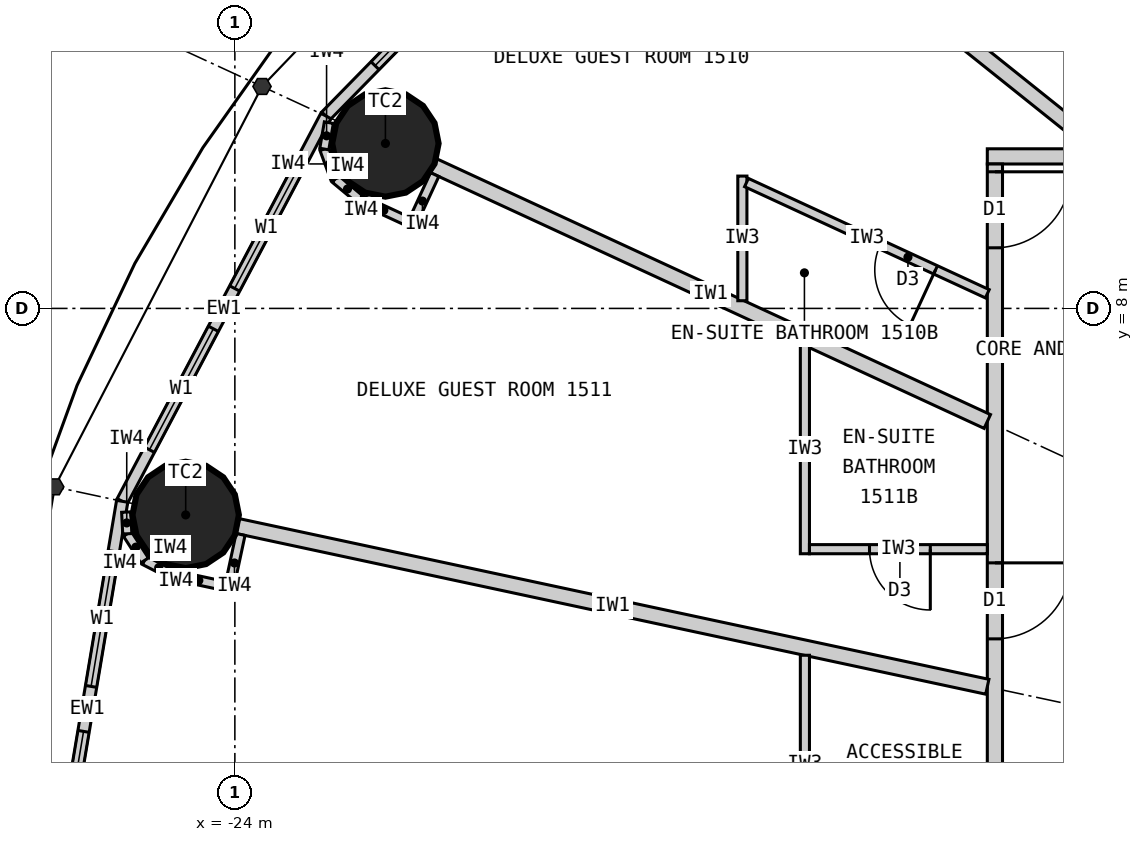
"""IFC4 building model, lengths in metres.
Left out: names, types, materials, properties, quantities, classifications, styles, units other than length and angle.
Written with IfcOpenShell. Run it as: python <this file> out.ifc"""

import sys

from ifc_helpers import new_model, si_unit, direction, frame, frame_2d, origin, origin_2d, place, context, subcontext, project, spatial, rectangle, circle, extrude, element, fill, save


model = new_model("IFC4")
c1 = context("Model", 3, precision=1e-05, world=origin(), true_north=direction((0.0, 1.0)))
c2 = subcontext(c1, "Body", "Model", "MODEL_VIEW")
j1 = project(units=[si_unit("LENGTHUNIT", "METRE"), si_unit("PLANEANGLEUNIT", "RADIAN")], contexts=[c1])
p1 = place(None, origin())
s1 = spatial("IfcSite", under=j1, at=p1, CompositionType="ELEMENT")
p2 = place(p1, origin())
s2 = spatial("IfcBuilding", under=s1, at=p2, CompositionType="ELEMENT")
p3 = place(p2, frame((0.0, 0.0, 63.9)))
s3 = spatial("IfcBuildingStorey", under=s2, at=p3, CompositionType="ELEMENT", Elevation=63.9)
for number, where, z_axis, x_axis in (
    (1, (-22.019, 10.17, 0.0), (0.0, 0.0, 1.0), (1.0, 0.0, 0.0)),
    (2, (-24.647, 5.283, 0.0), (0.0, 0.0, 1.0), (1.0, 0.0, 0.0)),
):
    element("IfcColumn", number, at=place(p3, frame(where, z_axis=z_axis, x_axis=x_axis)), inside=s3, PredefinedType="COLUMN", context=c2, shape_type="SweptSolid", body=[
        extrude(circle(Radius=0.7, at=origin_2d()), origin(), (0.0, 0.0, 1.0), 3.3),
    ])
p4 = place(p3, frame((-18.57, 14.856, 0.0), z_axis=(0.0, 0.0, 1.0), x_axis=(-0.699602905915, -0.714531856557, 0.0)))
e3 = element("IfcWall", 3, at=p4, inside=s3, PredefinedType="ELEMENTEDWALL", context=c2, shape_type="SweptSolid", body=[
    extrude(rectangle(XDim=6.051, YDim=0.15, at=frame_2d((3.025, 0.0))), origin(), (0.0, 0.0, 1.0), 3.12),
])
p5 = place(p4, frame((0.926, 0.0, 0.9)))
e4 = element("IfcOpeningElement", 4, at=p5, cuts=e3, PredefinedType="OPENING", context=c2, shape_type="SweptSolid", body=[
    extrude(rectangle(XDim=1.8, YDim=1.9, at=frame_2d((0.9, 0.95))), frame((0.0, 0.085, 0.0), z_axis=(0.0, -1.0, 0.0), x_axis=(1.0, 0.0, 0.0)), (0.0, 0.0, 1.0), 0.17),
])
p6 = place(p4, frame((3.325, 0.0, 0.9)))
e5 = element("IfcOpeningElement", 5, at=p6, cuts=e3, PredefinedType="OPENING", context=c2, shape_type="SweptSolid", body=[
    extrude(rectangle(XDim=1.8, YDim=1.9, at=frame_2d((0.9, 0.95))), frame((0.0, 0.085, 0.0), z_axis=(0.0, -1.0, 0.0), x_axis=(1.0, 0.0, 0.0)), (0.0, 0.0, 1.0), 0.17),
])
p7 = place(p3, frame((-22.803, 10.532, 0.0), z_axis=(0.0, 0.0, 1.0), x_axis=(-0.467296867008, -0.884100468321, 0.0)))
e6 = element("IfcWall", 6, at=p7, inside=s3, PredefinedType="ELEMENTEDWALL", context=c2, shape_type="SweptSolid", body=[
    extrude(rectangle(XDim=5.734, YDim=0.15, at=frame_2d((2.867, 0.0))), origin(), (0.0, 0.0, 1.0), 3.12),
])
p8 = place(p7, frame((0.767, 0.0, 0.9)))
e7 = element("IfcOpeningElement", 7, at=p8, cuts=e6, PredefinedType="OPENING", context=c2, shape_type="SweptSolid", body=[
    extrude(rectangle(XDim=1.8, YDim=1.9, at=frame_2d((0.9, 0.95))), frame((0.0, 0.085, 0.0), z_axis=(0.0, -1.0, 0.0), x_axis=(1.0, 0.0, 0.0)), (0.0, 0.0, 1.0), 0.17),
])
p9 = place(p7, frame((3.167, 0.0, 0.9)))
e8 = element("IfcOpeningElement", 8, at=p9, cuts=e6, PredefinedType="OPENING", context=c2, shape_type="SweptSolid", body=[
    extrude(rectangle(XDim=1.8, YDim=1.9, at=frame_2d((0.9, 0.95))), frame((0.0, 0.085, 0.0), z_axis=(0.0, -1.0, 0.0), x_axis=(1.0, 0.0, 0.0)), (0.0, 0.0, 1.0), 0.17),
])
p10 = place(p3, frame((-25.482, 5.462, 0.0), z_axis=(0.0, 0.0, 1.0), x_axis=(-0.165642551694, -0.986185857264, 0.0)))
e9 = element("IfcWall", 9, at=p10, inside=s3, PredefinedType="ELEMENTEDWALL", context=c2, shape_type="SweptSolid", body=[
    extrude(rectangle(XDim=5.539, YDim=0.15, at=frame_2d((2.77, 0.0))), origin(), (0.0, 0.0, 1.0), 3.12),
])
p11 = place(p10, frame((0.669, 0.0, 0.9)))
e10 = element("IfcOpeningElement", 10, at=p11, cuts=e9, PredefinedType="OPENING", context=c2, shape_type="SweptSolid", body=[
    extrude(rectangle(XDim=1.8, YDim=1.9, at=frame_2d((0.9, 0.95))), frame((0.0, 0.085, 0.0), z_axis=(0.0, -1.0, 0.0), x_axis=(1.0, 0.0, 0.0)), (0.0, 0.0, 1.0), 0.17),
])
p12 = place(p10, frame((3.07, 0.0, 0.9)))
e11 = element("IfcOpeningElement", 11, at=p12, cuts=e9, PredefinedType="OPENING", context=c2, shape_type="SweptSolid", body=[
    extrude(rectangle(XDim=1.8, YDim=1.9, at=frame_2d((0.9, 0.95))), frame((0.0, 0.085, 0.0), z_axis=(0.0, -1.0, 0.0), x_axis=(1.0, 0.0, 0.0)), (0.0, 0.0, 1.0), 0.17),
])
p13 = place(p3, frame((-14.1, 10.0, 0.0), z_axis=(0.0, 0.0, 1.0), x_axis=(1.0, 0.0, 0.0)))
e12 = element("IfcWall", 12, at=p13, inside=s3, PredefinedType="PARTITIONING", context=c2, shape_type="SweptSolid", body=[
    extrude(rectangle(XDim=28.2, YDim=0.2, at=frame_2d((14.1, 0.0))), origin(), (0.0, 0.0, 1.0), 3.12),
])
p14 = place(p13, frame((18.529, 0.0, 0.0)))
e13 = element("IfcOpeningElement", 13, at=p14, cuts=e12, PredefinedType="OPENING", context=c2, shape_type="SweptSolid", body=[
    extrude(rectangle(XDim=1.0, YDim=2.2, at=frame_2d((0.5, 1.1))), frame((0.0, 0.11, 0.0), z_axis=(0.0, -1.0, 0.0), x_axis=(1.0, 0.0, 0.0)), (0.0, 0.0, 1.0), 0.22),
])
p15 = place(p13, frame((14.623, 0.0, 0.0)))
e14 = element("IfcOpeningElement", 14, at=p15, cuts=e12, PredefinedType="OPENING", context=c2, shape_type="SweptSolid", body=[
    extrude(rectangle(XDim=1.0, YDim=2.2, at=frame_2d((0.5, 1.1))), frame((0.0, 0.11, 0.0), z_axis=(0.0, -1.0, 0.0), x_axis=(1.0, 0.0, 0.0)), (0.0, 0.0, 1.0), 0.22),
])
p16 = place(p13, frame((11.24, 0.0, 0.0)))
e15 = element("IfcOpeningElement", 15, at=p16, cuts=e12, PredefinedType="OPENING", context=c2, shape_type="SweptSolid", body=[
    extrude(rectangle(XDim=1.0, YDim=2.2, at=frame_2d((0.5, 1.1))), frame((0.0, 0.11, 0.0), z_axis=(0.0, -1.0, 0.0), x_axis=(1.0, 0.0, 0.0)), (0.0, 0.0, 1.0), 0.22),
])
p17 = place(p13, frame((8.671, 0.0, 0.0)))
e16 = element("IfcOpeningElement", 16, at=p17, cuts=e12, PredefinedType="OPENING", context=c2, shape_type="SweptSolid", body=[
    extrude(rectangle(XDim=1.0, YDim=2.2, at=frame_2d((0.5, 1.1))), frame((0.0, 0.11, 0.0), z_axis=(0.0, -1.0, 0.0), x_axis=(1.0, 0.0, 0.0)), (0.0, 0.0, 1.0), 0.22),
])
p18 = place(p13, frame((2.801, 0.0, 0.0)))
e17 = element("IfcOpeningElement", 17, at=p18, cuts=e12, PredefinedType="OPENING", context=c2, shape_type="SweptSolid", body=[
    extrude(rectangle(XDim=1.0, YDim=2.2, at=frame_2d((0.5, 1.1))), frame((0.0, 0.11, 0.0), z_axis=(0.0, -1.0, 0.0), x_axis=(1.0, 0.0, 0.0)), (0.0, 0.0, 1.0), 0.22),
])
p19 = place(p3, frame((-14.0, 9.9, 0.0), z_axis=(0.0, 0.0, 1.0), x_axis=(0.0, -1.0, 0.0)))
e18 = element("IfcWall", 18, at=p19, inside=s3, PredefinedType="PARTITIONING", context=c2, shape_type="SweptSolid", body=[
    extrude(rectangle(XDim=19.8, YDim=0.2, at=frame_2d((9.9, 0.0))), origin(), (0.0, 0.0, 1.0), 3.12),
])
p20 = place(p19, frame((0.103, 0.0, 0.0)))
e19 = element("IfcOpeningElement", 19, at=p20, cuts=e18, PredefinedType="OPENING", context=c2, shape_type="SweptSolid", body=[
    extrude(rectangle(XDim=1.0, YDim=2.2, at=frame_2d((0.5, 1.1))), frame((0.0, 0.11, 0.0), z_axis=(0.0, -1.0, 0.0), x_axis=(1.0, 0.0, 0.0)), (0.0, 0.0, 1.0), 0.22),
])
p21 = place(p19, frame((5.248, 0.0, 0.0)))
e20 = element("IfcOpeningElement", 20, at=p21, cuts=e18, PredefinedType="OPENING", context=c2, shape_type="SweptSolid", body=[
    extrude(rectangle(XDim=1.0, YDim=2.2, at=frame_2d((0.5, 1.1))), frame((0.0, 0.11, 0.0), z_axis=(0.0, -1.0, 0.0), x_axis=(1.0, 0.0, 0.0)), (0.0, 0.0, 1.0), 0.22),
])
p22 = place(p19, frame((9.438, 0.0, 0.0)))
e21 = element("IfcOpeningElement", 21, at=p22, cuts=e18, PredefinedType="OPENING", context=c2, shape_type="SweptSolid", body=[
    extrude(rectangle(XDim=1.0, YDim=2.2, at=frame_2d((0.5, 1.1))), frame((0.0, 0.11, 0.0), z_axis=(0.0, -1.0, 0.0), x_axis=(1.0, 0.0, 0.0)), (0.0, 0.0, 1.0), 0.22),
])
p23 = place(p19, frame((13.942, 0.0, 0.0)))
e22 = element("IfcOpeningElement", 22, at=p23, cuts=e18, PredefinedType="OPENING", context=c2, shape_type="SweptSolid", body=[
    extrude(rectangle(XDim=1.0, YDim=2.2, at=frame_2d((0.5, 1.1))), frame((0.0, 0.11, 0.0), z_axis=(0.0, -1.0, 0.0), x_axis=(1.0, 0.0, 0.0)), (0.0, 0.0, 1.0), 0.22),
])
p24 = place(p19, frame((18.698, 0.0, 0.0)))
e23 = element("IfcOpeningElement", 23, at=p24, cuts=e18, PredefinedType="OPENING", context=c2, shape_type="SweptSolid", body=[
    extrude(rectangle(XDim=1.0, YDim=2.2, at=frame_2d((0.5, 1.1))), frame((0.0, 0.11, 0.0), z_axis=(0.0, -1.0, 0.0), x_axis=(1.0, 0.0, 0.0)), (0.0, 0.0, 1.0), 0.22),
])
p25 = place(p3, frame((-12.625, 10.1, 0.0), z_axis=(0.0, 0.0, 1.0), x_axis=(-0.780892451574, 0.624665493744, 0.0)))
e24 = element("IfcWall", 24, at=p25, inside=s3, PredefinedType="PARTITIONING", context=c2, shape_type="SweptSolid", body=[
    extrude(rectangle(XDim=6.045, YDim=0.2, at=frame_2d((3.022, 0.0))), origin(), (0.0, 0.0, 1.0), 2.32),
])
p26 = place(p3, frame((-14.1, 6.512, 0.0), z_axis=(0.0, 0.0, 1.0), x_axis=(-0.907832871056, 0.419332181247, 0.0)))
e25 = element("IfcWall", 25, at=p26, inside=s3, PredefinedType="PARTITIONING", context=c2, shape_type="SweptSolid", body=[
    extrude(rectangle(XDim=8.023, YDim=0.2, at=frame_2d((4.011, 0.0))), origin(), (0.0, 0.0, 1.0), 2.32),
])
p27 = place(p3, frame((-14.1, 3.022, 0.0), z_axis=(0.0, 0.0, 1.0), x_axis=(-0.977790014929, 0.209586943072, 0.0)))
e26 = element("IfcWall", 26, at=p27, inside=s3, PredefinedType="PARTITIONING", context=c2, shape_type="SweptSolid", body=[
    extrude(rectangle(XDim=10.087, YDim=0.2, at=frame_2d((5.043, 0.0))), origin(), (0.0, 0.0, 1.0), 2.32),
])
p28 = place(p3, frame((-17.323, 8.101, 0.0), z_axis=(0.0, 0.0, 1.0), x_axis=(0.0, 1.0, 0.0)))
e27 = element("IfcWall", 27, at=p28, inside=s3, PredefinedType="PARTITIONING", context=c2, shape_type="SweptSolid", body=[
    extrude(rectangle(XDim=1.64, YDim=0.12, at=frame_2d((0.82, 0.0))), origin(), (0.0, 0.0, 1.0), 3.12),
])
p29 = place(p3, frame((-14.1, 8.193, 0.0), z_axis=(0.0, 0.0, 1.0), x_axis=(-0.907836493557, 0.419324338628, 0.0)))
e28 = element("IfcWall", 28, at=p29, inside=s3, PredefinedType="PARTITIONING", context=c2, shape_type="SweptSolid", body=[
    extrude(rectangle(XDim=3.49, YDim=0.12, at=frame_2d((1.745, 0.0))), origin(), (0.0, 0.0, 1.0), 3.12),
])
p30 = place(p29, frame((0.75, 0.0, 0.0)))
e29 = element("IfcOpeningElement", 29, at=p30, cuts=e28, PredefinedType="OPENING", context=c2, shape_type="SweptSolid", body=[
    extrude(rectangle(XDim=0.8, YDim=2.1, at=frame_2d((0.4, 1.05))), frame((0.0, 0.07, 0.0), z_axis=(0.0, -1.0, 0.0), x_axis=(1.0, 0.0, 0.0)), (0.0, 0.0, 1.0), 0.14),
])
p31 = place(p3, frame((-16.5, 7.521, 0.0), z_axis=(0.0, 0.0, 1.0), x_axis=(0.0, -1.0, 0.0)))
e30 = element("IfcWall", 30, at=p31, inside=s3, PredefinedType="PARTITIONING", context=c2, shape_type="SweptSolid", body=[
    extrude(rectangle(XDim=2.749, YDim=0.12, at=frame_2d((1.374, 0.0))), origin(), (0.0, 0.0, 1.0), 3.12),
])
p32 = place(p3, frame((-14.1, 4.833, 0.0), z_axis=(0.0, 0.0, 1.0), x_axis=(-1.0, 0.0, 0.0)))
e31 = element("IfcWall", 31, at=p32, inside=s3, PredefinedType="PARTITIONING", context=c2, shape_type="SweptSolid", body=[
    extrude(rectangle(XDim=2.34, YDim=0.12, at=frame_2d((1.17, 0.0))), origin(), (0.0, 0.0, 1.0), 3.12),
])
p33 = place(p32, frame((0.75, 0.0, 0.0)))
e32 = element("IfcOpeningElement", 32, at=p33, cuts=e31, PredefinedType="OPENING", context=c2, shape_type="SweptSolid", body=[
    extrude(rectangle(XDim=0.8, YDim=2.1, at=frame_2d((0.4, 1.05))), frame((0.0, 0.07, 0.0), z_axis=(0.0, -1.0, 0.0), x_axis=(1.0, 0.0, 0.0)), (0.0, 0.0, 1.0), 0.14),
])
p34 = place(p3, frame((-16.5, 3.437, 0.0), z_axis=(0.0, 0.0, 1.0), x_axis=(0.0, -1.0, 0.0)))
e33 = element("IfcWall", 33, at=p34, inside=s3, PredefinedType="PARTITIONING", context=c2, shape_type="SweptSolid", body=[
    extrude(rectangle(XDim=2.854, YDim=0.12, at=frame_2d((1.427, 0.0))), origin(), (0.0, 0.0, 1.0), 3.12),
])
p35 = place(p3, frame((-21.371, 9.761, 0.0), z_axis=(0.0, 0.0, 1.0), x_axis=(-0.419259891039, -0.907866258744, 0.0)))
e34 = element("IfcWall", 34, at=p35, inside=s3, PredefinedType="PARTITIONING", context=c2, shape_type="SweptSolid", body=[
    extrude(rectangle(XDim=0.768, YDim=0.12, at=frame_2d((0.384, 0.0))), origin(), (0.0, 0.0, 1.0), 3.12),
])
p36 = place(p3, frame((-21.722, 9.144, 0.0), z_axis=(0.0, 0.0, 1.0), x_axis=(-0.907877701396, 0.419235112208, 0.0)))
e35 = element("IfcWall", 35, at=p36, inside=s3, PredefinedType="PARTITIONING", context=c2, shape_type="SweptSolid", body=[
    extrude(rectangle(XDim=0.7, YDim=0.12, at=frame_2d((0.35, 0.0))), origin(), (0.0, 0.0, 1.0), 3.12),
])
p37 = place(p3, frame((-22.358, 9.437, 0.0), z_axis=(0.0, 0.0, 1.0), x_axis=(-0.768412687942, 0.639954639806, 0.0)))
e36 = element("IfcWall", 36, at=p37, inside=s3, PredefinedType="PARTITIONING", context=c2, shape_type="SweptSolid", body=[
    extrude(rectangle(XDim=0.418, YDim=0.12, at=frame_2d((0.209, 0.0))), origin(), (0.0, 0.0, 1.0), 3.12),
])
p38 = place(p3, frame((-22.679, 9.705, 0.0), z_axis=(0.0, 0.0, 1.0), x_axis=(-0.345164001646, 0.938542386879, 0.0)))
e37 = element("IfcWall", 37, at=p38, inside=s3, PredefinedType="PARTITIONING", context=c2, shape_type="SweptSolid", body=[
    extrude(rectangle(XDim=0.418, YDim=0.12, at=frame_2d((0.209, 0.0))), origin(), (0.0, 0.0, 1.0), 3.12),
])
p39 = place(p3, frame((-22.823, 10.097, 0.0), z_axis=(0.0, 0.0, 1.0), x_axis=(0.169674995186, 0.985500074079, 0.0)))
e38 = element("IfcWall", 38, at=p39, inside=s3, PredefinedType="PARTITIONING", context=c2, shape_type="SweptSolid", body=[
    extrude(rectangle(XDim=0.353, YDim=0.12, at=frame_2d((0.176, 0.0))), origin(), (0.0, 0.0, 1.0), 3.12),
])
p40 = place(p3, frame((-23.925, 5.026, 0.0), z_axis=(0.0, 0.0, 1.0), x_axis=(-0.209681192172, -0.977769808109, 0.0)))
e39 = element("IfcWall", 39, at=p40, inside=s3, PredefinedType="PARTITIONING", context=c2, shape_type="SweptSolid", body=[
    extrude(rectangle(XDim=0.767, YDim=0.12, at=frame_2d((0.384, 0.0))), origin(), (0.0, 0.0, 1.0), 3.12),
])
p41 = place(p3, frame((-24.132, 4.347, 0.0), z_axis=(0.0, 0.0, 1.0), x_axis=(-0.977776882509, 0.209648200638, 0.0)))
e40 = element("IfcWall", 40, at=p41, inside=s3, PredefinedType="PARTITIONING", context=c2, shape_type="SweptSolid", body=[
    extrude(rectangle(XDim=0.7, YDim=0.12, at=frame_2d((0.35, 0.0))), origin(), (0.0, 0.0, 1.0), 3.12),
])
for number, where, z_axis, x_axis in (
    (41, (-24.816, 4.494, 0.0), (0.0, 0.0, 1.0), (-0.89, 0.455, 0.0)),
    (42, (-25.188, 4.684, 0.0), (0.0, 0.0, 1.0), (-0.543, 0.84, 0.0)),
):
    element("IfcWall", number, at=place(p3, frame(where, z_axis=z_axis, x_axis=x_axis)), inside=s3, PredefinedType="PARTITIONING", context=c2, shape_type="SweptSolid", body=[
        extrude(rectangle(XDim=0.418, YDim=0.12, at=frame_2d((0.209, 0.0))), origin(), (0.0, 0.0, 1.0), 3.12),
    ])
p42 = place(p3, frame((-25.416, 5.035, 0.0), z_axis=(0.0, 0.0, 1.0), x_axis=(-0.050406329159, 0.998728793007, 0.0)))
e43 = element("IfcWall", 43, at=p42, inside=s3, PredefinedType="PARTITIONING", context=c2, shape_type="SweptSolid", body=[
    extrude(rectangle(XDim=0.286, YDim=0.12, at=frame_2d((0.143, 0.0))), origin(), (0.0, 0.0, 1.0), 3.12),
])
p43 = place(p6, origin())
e44 = element("IfcWindow", 44, at=p43, inside=s3, PartitioningType="SINGLE_PANEL", PredefinedType="WINDOW", context=c2, shape_type="SweptSolid", body=[
    extrude(rectangle(XDim=1.8, YDim=1.9, at=frame_2d((0.9, 0.95))), frame((0.0, 0.03, 0.0), z_axis=(0.0, -1.0, 0.0), x_axis=(1.0, 0.0, 0.0)), (0.0, 0.0, 1.0), 0.06),
])
fill(e5, e44)
p44 = place(p8, origin())
e45 = element("IfcWindow", 45, at=p44, inside=s3, PartitioningType="SINGLE_PANEL", PredefinedType="WINDOW", context=c2, shape_type="SweptSolid", body=[
    extrude(rectangle(XDim=1.8, YDim=1.9, at=frame_2d((0.9, 0.95))), frame((0.0, 0.03, 0.0), z_axis=(0.0, -1.0, 0.0), x_axis=(1.0, 0.0, 0.0)), (0.0, 0.0, 1.0), 0.06),
])
fill(e7, e45)
p45 = place(p9, origin())
e46 = element("IfcWindow", 46, at=p45, inside=s3, PartitioningType="SINGLE_PANEL", PredefinedType="WINDOW", context=c2, shape_type="SweptSolid", body=[
    extrude(rectangle(XDim=1.8, YDim=1.9, at=frame_2d((0.9, 0.95))), frame((0.0, 0.03, 0.0), z_axis=(0.0, -1.0, 0.0), x_axis=(1.0, 0.0, 0.0)), (0.0, 0.0, 1.0), 0.06),
])
fill(e8, e46)
p46 = place(p11, origin())
e47 = element("IfcWindow", 47, at=p46, inside=s3, PartitioningType="SINGLE_PANEL", PredefinedType="WINDOW", context=c2, shape_type="SweptSolid", body=[
    extrude(rectangle(XDim=1.8, YDim=1.9, at=frame_2d((0.9, 0.95))), frame((0.0, 0.03, 0.0), z_axis=(0.0, -1.0, 0.0), x_axis=(1.0, 0.0, 0.0)), (0.0, 0.0, 1.0), 0.06),
])
fill(e10, e47)
p47 = place(p12, origin())
e48 = element("IfcWindow", 48, at=p47, inside=s3, PartitioningType="SINGLE_PANEL", PredefinedType="WINDOW", context=c2, shape_type="SweptSolid", body=[
    extrude(rectangle(XDim=1.8, YDim=1.9, at=frame_2d((0.9, 0.95))), frame((0.0, 0.03, 0.0), z_axis=(0.0, -1.0, 0.0), x_axis=(1.0, 0.0, 0.0)), (0.0, 0.0, 1.0), 0.06),
])
fill(e11, e48)
p48 = place(p30, origin())
e49 = element("IfcDoor", 49, at=p48, inside=s3, OperationType="SINGLE_SWING_LEFT", PredefinedType="DOOR", context=c2, shape_type="SweptSolid", body=[
    extrude(rectangle(XDim=0.8, YDim=2.1, at=frame_2d((0.4, 1.05))), frame((0.0, 0.025, 0.0), z_axis=(0.0, -1.0, 0.0), x_axis=(1.0, 0.0, 0.0)), (0.0, 0.0, 1.0), 0.05),
])
fill(e29, e49)
p49 = place(p20, origin())
e50 = element("IfcDoor", 50, at=p49, inside=s3, OperationType="SINGLE_SWING_LEFT", PredefinedType="DOOR", context=c2, shape_type="SweptSolid", body=[
    extrude(rectangle(XDim=1.0, YDim=2.2, at=frame_2d((0.5, 1.1))), frame((0.0, 0.025, 0.0), z_axis=(0.0, -1.0, 0.0), x_axis=(1.0, 0.0, 0.0)), (0.0, 0.0, 1.0), 0.05),
])
fill(e19, e50)
p50 = place(p33, origin())
e51 = element("IfcDoor", 51, at=p50, inside=s3, OperationType="SINGLE_SWING_LEFT", PredefinedType="DOOR", context=c2, shape_type="SweptSolid", body=[
    extrude(rectangle(XDim=0.8, YDim=2.1, at=frame_2d((0.4, 1.05))), frame((0.0, 0.025, 0.0), z_axis=(0.0, -1.0, 0.0), x_axis=(1.0, 0.0, 0.0)), (0.0, 0.0, 1.0), 0.05),
])
fill(e32, e51)
p51 = place(p21, origin())
e52 = element("IfcDoor", 52, at=p51, inside=s3, OperationType="SINGLE_SWING_LEFT", PredefinedType="DOOR", context=c2, shape_type="SweptSolid", body=[
    extrude(rectangle(XDim=1.0, YDim=2.2, at=frame_2d((0.5, 1.1))), frame((0.0, 0.025, 0.0), z_axis=(0.0, -1.0, 0.0), x_axis=(1.0, 0.0, 0.0)), (0.0, 0.0, 1.0), 0.05),
])
fill(e20, e52)
save(model, sys.argv[1])
